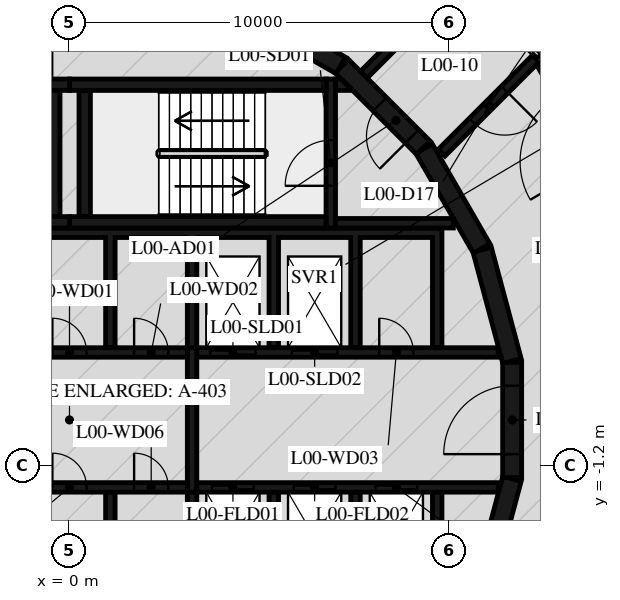
"""IFC4 building model, lengths in metres.
Left out: names, types, materials, properties, quantities, classifications, styles, units other than length and angle.
Written with IfcOpenShell. Run it as: python <this file> out.ifc"""

import sys

from ifc_helpers import new_model, si_unit, direction, frame, frame_2d, origin, place, context, subcontext, project, spatial, polyline, rectangle, outline, extrude, element, fill, save


model = new_model("IFC4")
c1 = context("Model", 3, precision=1e-05, world=origin(), true_north=direction((0.0, 1.0)))
c2 = subcontext(c1, "Body", "Model", "MODEL_VIEW")
j1 = project(units=[si_unit("LENGTHUNIT", "METRE"), si_unit("PLANEANGLEUNIT", "RADIAN")], contexts=[c1])
p1 = place(None, origin())
s1 = spatial("IfcSite", under=j1, at=p1, CompositionType="ELEMENT")
p2 = place(p1, origin())
s2 = spatial("IfcBuilding", under=s1, at=p2, CompositionType="ELEMENT")
p3 = place(p2, origin())
s3 = spatial("IfcBuildingStorey", under=s2, at=p3, CompositionType="ELEMENT", Elevation=0.0)
p4 = place(p3, frame((10.858, -4.479, 0.0), z_axis=(0.0, 0.0, 1.0), x_axis=(0.258734743916, 0.965948410781, 0.0)))
e1 = element("IfcWall", 1, at=p4, inside=s3, PredefinedType="SHEAR", context=c2, shape_type="SweptSolid", body=[
    extrude(rectangle(XDim=3.033, YDim=0.5, at=frame_2d((1.516, 0.0))), origin(), (0.0, 0.0, 1.0), 8.62),
])
p5 = place(p3, frame((11.647, -1.516, 0.0), z_axis=(0.0, 0.0, 1.0), x_axis=(0.0, 1.0, 0.0)))
e2 = element("IfcWall", 2, at=p5, inside=s3, PredefinedType="SHEAR", context=c2, shape_type="SweptSolid", body=[
    extrude(rectangle(XDim=3.033, YDim=0.5, at=frame_2d((1.516, 0.0))), origin(), (0.0, 0.0, 1.0), 8.62),
])
p6 = place(p5, frame((0.616, 0.0, 0.0)))
e3 = element("IfcOpeningElement", 3, at=p6, cuts=e2, PredefinedType="OPENING", context=c2, shape_type="SweptSolid", body=[
    extrude(rectangle(XDim=1.8, YDim=2.1, at=frame_2d((0.9, 1.05))), frame((0.0, 0.26, 0.0), z_axis=(0.0, -1.0, 0.0), x_axis=(1.0, 0.0, 0.0)), (0.0, 0.0, 1.0), 0.52),
])
for number, where, z_axis, x_axis in (
    (4, (11.643, 1.55, 0.0), (0.0, 0.0, 1.0), (-0.259, 0.966, 0.0)),
    (5, (10.845, 4.51, 0.0), (0.0, 0.0, 1.0), (-0.5, 0.866, 0.0)),
):
    element("IfcWall", number, at=place(p3, frame(where, z_axis=z_axis, x_axis=x_axis)), inside=s3, PredefinedType="SHEAR", context=c2, shape_type="SweptSolid", body=[
        extrude(rectangle(XDim=3.033, YDim=0.5, at=frame_2d((1.516, 0.0))), origin(), (0.0, 0.0, 1.0), 8.62),
    ])
p7 = place(p3, frame((9.308, 7.164, 0.0), z_axis=(0.0, 0.0, 1.0), x_axis=(-0.707106781187, 0.707106781187, 0.0)))
e6 = element("IfcWall", 6, at=p7, inside=s3, PredefinedType="SHEAR", context=c2, shape_type="SweptSolid", body=[
    extrude(rectangle(XDim=3.032, YDim=0.5, at=frame_2d((1.516, 0.0))), origin(), (0.0, 0.0, 1.0), 8.62),
])
p8 = place(p7, frame((0.416, 0.0, 0.0)))
e7 = element("IfcOpeningElement", 7, at=p8, cuts=e6, PredefinedType="OPENING", context=c2, shape_type="SweptSolid", body=[
    extrude(rectangle(XDim=1.2, YDim=2.1, at=frame_2d((0.6, 1.05))), frame((0.0, 0.26, 0.0), z_axis=(0.0, -1.0, 0.0), x_axis=(1.0, 0.0, 0.0)), (0.0, 0.0, 1.0), 0.52),
])
p9 = place(p3, frame((7.137, 9.329, 0.0), z_axis=(0.0, 0.0, 1.0), x_axis=(-0.865975092491, 0.500087131594, 0.0)))
e8 = element("IfcWall", 8, at=p9, inside=s3, PredefinedType="SHEAR", context=c2, shape_type="SweptSolid", body=[
    extrude(rectangle(XDim=3.033, YDim=0.5, at=frame_2d((1.516, 0.0))), origin(), (0.0, 0.0, 1.0), 8.62),
])
for number, where, z_axis, x_axis in (
    (9, (0.0, 5.2, 0.0), (0.0, 0.0, 1.0), (1.0, 0.0, 0.0)),
    (10, (0.0, 8.82, 0.0), (0.0, 0.0, 1.0), (1.0, 0.0, 0.0)),
):
    element("IfcWall", number, at=place(p3, frame(where, z_axis=z_axis, x_axis=x_axis)), inside=s3, PredefinedType="SHEAR", context=c2, shape_type="SweptSolid", body=[
        extrude(rectangle(XDim=6.75, YDim=0.3, at=frame_2d((3.375, 0.0))), origin(), (0.0, 0.0, 1.0), 8.62),
    ])
p10 = place(p3, frame((0.4, 5.35, 0.0), z_axis=(0.0, 0.0, 1.0), x_axis=(0.0, 1.0, 0.0)))
e11 = element("IfcWall", 11, at=p10, inside=s3, PredefinedType="SHEAR", context=c2, shape_type="SweptSolid", body=[
    extrude(rectangle(XDim=3.32, YDim=0.3, at=frame_2d((1.66, 0.0))), origin(), (0.0, 0.0, 1.0), 8.62),
])
p11 = place(p3, frame((6.875, 5.05, 0.0), z_axis=(0.0, 0.0, 1.0), x_axis=(0.0, 1.0, 0.0)))
e12 = element("IfcWall", 12, at=p11, inside=s3, PredefinedType="SHEAR", context=c2, shape_type="SweptSolid", body=[
    extrude(rectangle(XDim=3.92, YDim=0.25, at=frame_2d((1.96, 0.0))), origin(), (0.0, 0.0, 1.0), 8.62),
])
p12 = place(p11, frame((1.11, 0.0, 0.0)))
e13 = element("IfcOpeningElement", 13, at=p12, cuts=e12, PredefinedType="OPENING", context=c2, shape_type="SweptSolid", body=[
    extrude(rectangle(XDim=1.2, YDim=2.1, at=frame_2d((0.6, 1.05))), frame((0.0, 0.135, 0.0), z_axis=(0.0, -1.0, 0.0), x_axis=(1.0, 0.0, 0.0)), (0.0, 0.0, 1.0), 0.27),
])
p13 = place(p3, frame((7.0, 5.175, 0.0), z_axis=(0.0, 0.0, 1.0), x_axis=(1.0, 0.0, 0.0)))
e14 = element("IfcWall", 14, at=p13, inside=s3, PredefinedType="SHEAR", context=c2, shape_type="SweptSolid", body=[
    extrude(rectangle(XDim=3.1, YDim=0.25, at=frame_2d((1.55, 0.0))), origin(), (0.0, 0.0, 1.0), 8.62),
])
p14 = place(p3, origin())
e15 = element("IfcWall", 15, at=p14, inside=s3, PredefinedType="SHEAR", context=c2, shape_type="SweptSolid", body=[
    extrude(outline(polyline([(7.448, 8.67), (7.0, 8.67), (7.0, 8.97), (7.148, 8.97), (7.448, 8.67)])), origin(), (0.0, 0.0, 1.0), 8.62),
])
for number, where, z_axis, x_axis in (
    (16, (-6.75, 5.2, 0.0), (0.0, 0.0, 1.0), (1.0, 0.0, 0.0)),
    (17, (-6.75, 8.82, 0.0), (0.0, 0.0, 1.0), (1.0, 0.0, 0.0)),
):
    element("IfcWall", number, at=place(p3, frame(where, z_axis=z_axis, x_axis=x_axis)), inside=s3, PredefinedType="SHEAR", context=c2, shape_type="SweptSolid", body=[
        extrude(rectangle(XDim=6.75, YDim=0.3, at=frame_2d((3.375, 0.0))), origin(), (0.0, 0.0, 1.0), 8.62),
    ])
p15 = place(p3, frame((-0.4, 5.35, 0.0), z_axis=(0.0, 0.0, 1.0), x_axis=(0.0, 1.0, 0.0)))
e18 = element("IfcWall", 18, at=p15, inside=s3, PredefinedType="SHEAR", context=c2, shape_type="SweptSolid", body=[
    extrude(rectangle(XDim=3.32, YDim=0.3, at=frame_2d((1.66, 0.0))), origin(), (0.0, 0.0, 1.0), 8.62),
])
p16 = place(p3, origin())
e19 = element("IfcWall", 19, at=p16, inside=s3, PredefinedType="SHEAR", context=c2, shape_type="SweptSolid", body=[
    extrude(outline(polyline([(-9.55, 4.8), (-7.65, 4.8), (-7.65, 1.9), (-7.4, 1.9), (-7.4, 4.8), (-5.5, 4.8), (-5.5, 1.9), (-5.25, 1.9), (-5.25, 4.8), (-3.35, 4.8), (-3.35, 1.9), (-3.1, 1.9), (-3.1, 4.8), (-1.2, 4.8), (-1.2, 1.9), (-0.95, 1.9), (-0.95, 4.8), (0.95, 4.8), (0.95, 1.9), (1.2, 1.9), (1.2, 4.8), (3.1, 4.8), (3.1, 1.9), (3.35, 1.9), (3.35, 4.8), (5.25, 4.8), (5.25, 1.9), (5.5, 1.9), (5.5, 4.8), (7.4, 4.8), (7.4, 1.9), (7.65, 1.9), (7.65, 4.8), (9.55, 4.8), (9.55, 1.9), (9.8, 1.9), (9.8, 4.8), (9.8, 5.05), (-9.8, 5.05), (-9.8, 4.8), (-9.8, 1.9), (-9.55, 1.9), (-9.55, 4.8)])), origin(), (0.0, 0.0, 1.0), 8.62),
])
p17 = place(p3, origin())
e20 = element("IfcWall", 20, at=p17, inside=s3, PredefinedType="SHEAR", context=c2, shape_type="SweptSolid", body=[
    extrude(outline(polyline([(9.8, -5.05), (9.8, -4.8), (9.8, -1.9), (9.55, -1.9), (9.55, -4.8), (7.65, -4.8), (7.65, -1.9), (7.4, -1.9), (7.4, -4.8), (5.5, -4.8), (5.5, -1.9), (5.25, -1.9), (5.25, -4.8), (3.35, -4.8), (3.35, -1.9), (3.1, -1.9), (3.1, -4.8), (1.2, -4.8), (1.2, -1.9), (0.95, -1.9), (0.95, -4.8), (-0.95, -4.8), (-0.95, -1.9), (-1.2, -1.9), (-1.2, -4.8), (-5.25, -4.8), (-5.25, -1.9), (-5.5, -1.9), (-5.5, -4.8), (-7.4, -4.8), (-7.4, -1.9), (-7.65, -1.9), (-7.65, -4.8), (-9.55, -4.8), (-9.55, -1.9), (-9.8, -1.9), (-9.8, -4.8), (-9.8, -5.05), (9.8, -5.05)])), origin(), (0.0, 0.0, 1.0), 8.62),
])
p18 = place(p3, frame((-11.28, 1.775, 0.0), z_axis=(0.0, 0.0, 1.0), x_axis=(1.0, 0.0, 0.0)))
e21 = element("IfcWall", 21, at=p18, inside=s3, PredefinedType="SHEAR", context=c2, shape_type="SweptSolid", body=[
    extrude(rectangle(XDim=14.38, YDim=0.25, at=frame_2d((7.19, 0.0))), origin(), (0.0, 0.0, 1.0), 8.62),
])
p19 = place(p18, frame((2.13, 0.0, 0.0)))
e22 = element("IfcOpeningElement", 22, at=p19, cuts=e21, PredefinedType="OPENING", context=c2, shape_type="SweptSolid", body=[
    extrude(rectangle(XDim=1.1, YDim=2.1, at=frame_2d((0.55, 1.05))), frame((0.0, 0.135, 0.0), z_axis=(0.0, -1.0, 0.0), x_axis=(1.0, 0.0, 0.0)), (0.0, 0.0, 1.0), 0.27),
])
p20 = place(p18, frame((4.28, 0.0, 0.0)))
e23 = element("IfcOpeningElement", 23, at=p20, cuts=e21, PredefinedType="OPENING", context=c2, shape_type="SweptSolid", body=[
    extrude(rectangle(XDim=1.1, YDim=2.1, at=frame_2d((0.55, 1.05))), frame((0.0, 0.135, 0.0), z_axis=(0.0, -1.0, 0.0), x_axis=(1.0, 0.0, 0.0)), (0.0, 0.0, 1.0), 0.27),
])
p21 = place(p18, frame((6.43, 0.0, 0.0)))
e24 = element("IfcOpeningElement", 24, at=p21, cuts=e21, PredefinedType="OPENING", context=c2, shape_type="SweptSolid", body=[
    extrude(rectangle(XDim=1.1, YDim=2.1, at=frame_2d((0.55, 1.05))), frame((0.0, 0.135, 0.0), z_axis=(0.0, -1.0, 0.0), x_axis=(1.0, 0.0, 0.0)), (0.0, 0.0, 1.0), 0.27),
])
p22 = place(p18, frame((8.58, 0.0, 0.0)))
e25 = element("IfcOpeningElement", 25, at=p22, cuts=e21, PredefinedType="OPENING", context=c2, shape_type="SweptSolid", body=[
    extrude(rectangle(XDim=1.1, YDim=2.1, at=frame_2d((0.55, 1.05))), frame((0.0, 0.135, 0.0), z_axis=(0.0, -1.0, 0.0), x_axis=(1.0, 0.0, 0.0)), (0.0, 0.0, 1.0), 0.27),
])
p23 = place(p18, frame((10.83, 0.0, 0.0)))
e26 = element("IfcOpeningElement", 26, at=p23, cuts=e21, PredefinedType="OPENING", context=c2, shape_type="SweptSolid", body=[
    extrude(rectangle(XDim=0.9, YDim=2.1, at=frame_2d((0.45, 1.05))), frame((0.0, 0.135, 0.0), z_axis=(0.0, -1.0, 0.0), x_axis=(1.0, 0.0, 0.0)), (0.0, 0.0, 1.0), 0.27),
])
p24 = place(p18, frame((12.98, 0.0, 0.0)))
e27 = element("IfcOpeningElement", 27, at=p24, cuts=e21, PredefinedType="OPENING", context=c2, shape_type="SweptSolid", body=[
    extrude(rectangle(XDim=0.9, YDim=2.1, at=frame_2d((0.45, 1.05))), frame((0.0, 0.135, 0.0), z_axis=(0.0, -1.0, 0.0), x_axis=(1.0, 0.0, 0.0)), (0.0, 0.0, 1.0), 0.27),
])
p25 = place(p3, frame((3.35, 1.775, 0.0), z_axis=(0.0, 0.0, 1.0), x_axis=(1.0, 0.0, 0.0)))
e28 = element("IfcWall", 28, at=p25, inside=s3, PredefinedType="SHEAR", context=c2, shape_type="SweptSolid", body=[
    extrude(rectangle(XDim=7.93, YDim=0.25, at=frame_2d((3.965, 0.0))), origin(), (0.0, 0.0, 1.0), 8.62),
])
p26 = place(p25, frame((0.35, 0.0, 0.0)))
e29 = element("IfcOpeningElement", 29, at=p26, cuts=e28, PredefinedType="OPENING", context=c2, shape_type="SweptSolid", body=[
    extrude(rectangle(XDim=1.2, YDim=2.4, at=frame_2d((0.6, 1.2))), frame((0.0, 0.135, 0.0), z_axis=(0.0, -1.0, 0.0), x_axis=(1.0, 0.0, 0.0)), (0.0, 0.0, 1.0), 0.27),
])
p27 = place(p25, frame((2.5, 0.0, 0.0)))
e30 = element("IfcOpeningElement", 30, at=p27, cuts=e28, PredefinedType="OPENING", context=c2, shape_type="SweptSolid", body=[
    extrude(rectangle(XDim=1.2, YDim=2.4, at=frame_2d((0.6, 1.2))), frame((0.0, 0.135, 0.0), z_axis=(0.0, -1.0, 0.0), x_axis=(1.0, 0.0, 0.0)), (0.0, 0.0, 1.0), 0.27),
])
p28 = place(p25, frame((4.8, 0.0, 0.0)))
e31 = element("IfcOpeningElement", 31, at=p28, cuts=e28, PredefinedType="OPENING", context=c2, shape_type="SweptSolid", body=[
    extrude(rectangle(XDim=0.9, YDim=2.1, at=frame_2d((0.45, 1.05))), frame((0.0, 0.135, 0.0), z_axis=(0.0, -1.0, 0.0), x_axis=(1.0, 0.0, 0.0)), (0.0, 0.0, 1.0), 0.27),
])
p29 = place(p3, frame((-11.28, -1.775, 0.0), z_axis=(0.0, 0.0, 1.0), x_axis=(1.0, 0.0, 0.0)))
e32 = element("IfcWall", 32, at=p29, inside=s3, PredefinedType="SHEAR", context=c2, shape_type="SweptSolid", body=[
    extrude(rectangle(XDim=14.38, YDim=0.25, at=frame_2d((7.19, 0.0))), origin(), (0.0, 0.0, 1.0), 8.62),
])
p30 = place(p29, frame((2.03, 0.0, 0.0)))
e33 = element("IfcOpeningElement", 33, at=p30, cuts=e32, PredefinedType="OPENING", context=c2, shape_type="SweptSolid", body=[
    extrude(rectangle(XDim=1.3, YDim=2.1, at=frame_2d((0.65, 1.05))), frame((0.0, 0.135, 0.0), z_axis=(0.0, -1.0, 0.0), x_axis=(1.0, 0.0, 0.0)), (0.0, 0.0, 1.0), 0.27),
])
p31 = place(p29, frame((4.18, 0.0, 0.0)))
e34 = element("IfcOpeningElement", 34, at=p31, cuts=e32, PredefinedType="OPENING", context=c2, shape_type="SweptSolid", body=[
    extrude(rectangle(XDim=1.3, YDim=2.1, at=frame_2d((0.65, 1.05))), frame((0.0, 0.135, 0.0), z_axis=(0.0, -1.0, 0.0), x_axis=(1.0, 0.0, 0.0)), (0.0, 0.0, 1.0), 0.27),
])
p32 = place(p29, frame((7.605, 0.0, 0.0)))
e35 = element("IfcOpeningElement", 35, at=p32, cuts=e32, PredefinedType="OPENING", context=c2, shape_type="SweptSolid", body=[
    extrude(rectangle(XDim=0.9, YDim=2.1, at=frame_2d((0.45, 1.05))), frame((0.0, 0.135, 0.0), z_axis=(0.0, -1.0, 0.0), x_axis=(1.0, 0.0, 0.0)), (0.0, 0.0, 1.0), 0.27),
])
p33 = place(p29, frame((10.83, 0.0, 0.0)))
e36 = element("IfcOpeningElement", 36, at=p33, cuts=e32, PredefinedType="OPENING", context=c2, shape_type="SweptSolid", body=[
    extrude(rectangle(XDim=0.9, YDim=2.1, at=frame_2d((0.45, 1.05))), frame((0.0, 0.135, 0.0), z_axis=(0.0, -1.0, 0.0), x_axis=(1.0, 0.0, 0.0)), (0.0, 0.0, 1.0), 0.27),
])
p34 = place(p29, frame((12.98, 0.0, 0.0)))
e37 = element("IfcOpeningElement", 37, at=p34, cuts=e32, PredefinedType="OPENING", context=c2, shape_type="SweptSolid", body=[
    extrude(rectangle(XDim=0.9, YDim=2.1, at=frame_2d((0.45, 1.05))), frame((0.0, 0.135, 0.0), z_axis=(0.0, -1.0, 0.0), x_axis=(1.0, 0.0, 0.0)), (0.0, 0.0, 1.0), 0.27),
])
p35 = place(p3, frame((3.35, -1.775, 0.0), z_axis=(0.0, 0.0, 1.0), x_axis=(1.0, 0.0, 0.0)))
e38 = element("IfcWall", 38, at=p35, inside=s3, PredefinedType="SHEAR", context=c2, shape_type="SweptSolid", body=[
    extrude(rectangle(XDim=7.93, YDim=0.25, at=frame_2d((3.965, 0.0))), origin(), (0.0, 0.0, 1.0), 8.62),
])
p36 = place(p35, frame((0.4, 0.0, 0.0)))
e39 = element("IfcOpeningElement", 39, at=p36, cuts=e38, PredefinedType="OPENING", context=c2, shape_type="SweptSolid", body=[
    extrude(rectangle(XDim=1.1, YDim=2.4, at=frame_2d((0.55, 1.2))), frame((0.0, 0.135, 0.0), z_axis=(0.0, -1.0, 0.0), x_axis=(1.0, 0.0, 0.0)), (0.0, 0.0, 1.0), 0.27),
])
p37 = place(p35, frame((2.55, 0.0, 0.0)))
e40 = element("IfcOpeningElement", 40, at=p37, cuts=e38, PredefinedType="OPENING", context=c2, shape_type="SweptSolid", body=[
    extrude(rectangle(XDim=1.1, YDim=2.4, at=frame_2d((0.55, 1.2))), frame((0.0, 0.135, 0.0), z_axis=(0.0, -1.0, 0.0), x_axis=(1.0, 0.0, 0.0)), (0.0, 0.0, 1.0), 0.27),
])
p38 = place(p35, frame((4.7, 0.0, 0.0)))
e41 = element("IfcOpeningElement", 41, at=p38, cuts=e38, PredefinedType="OPENING", context=c2, shape_type="SweptSolid", body=[
    extrude(rectangle(XDim=1.1, YDim=2.4, at=frame_2d((0.55, 1.2))), frame((0.0, 0.135, 0.0), z_axis=(0.0, -1.0, 0.0), x_axis=(1.0, 0.0, 0.0)), (0.0, 0.0, 1.0), 0.27),
])
p39 = place(p3, frame((3.225, -1.9, 0.0), z_axis=(0.0, 0.0, 1.0), x_axis=(0.0, 1.0, 0.0)))
e42 = element("IfcWall", 42, at=p39, inside=s3, PredefinedType="SHEAR", context=c2, shape_type="SweptSolid", body=[
    extrude(rectangle(XDim=3.8, YDim=0.25, at=frame_2d((1.9, 0.0))), origin(), (0.0, 0.0, 1.0), 8.62),
])
p40 = place(p3, frame((7.74, 9.08, 0.0), z_axis=(0.0, 0.0, 1.0), x_axis=(0.707106781187, 0.707106781187, 0.0)))
e43 = element("IfcWall", 43, at=p40, inside=s3, PredefinedType="PARTITIONING", context=c2, shape_type="SweptSolid", body=[
    extrude(rectangle(XDim=3.507, YDim=0.25, at=frame_2d((1.754, 0.0))), origin(), (0.0, 0.0, 1.0), 8.62),
])
p41 = place(p40, frame((1.154, 0.0, 0.0)))
e44 = element("IfcOpeningElement", 44, at=p41, cuts=e43, PredefinedType="OPENING", context=c2, shape_type="SweptSolid", body=[
    extrude(rectangle(XDim=1.2, YDim=2.1, at=frame_2d((0.6, 1.05))), frame((0.0, 0.135, 0.0), z_axis=(0.0, -1.0, 0.0), x_axis=(1.0, 0.0, 0.0)), (0.0, 0.0, 1.0), 0.27),
])
p42 = place(p3, frame((12.27, 9.51, 0.0), z_axis=(0.0, 0.0, 1.0), x_axis=(-0.707106781187, -0.707106781187, 0.0)))
e45 = element("IfcWall", 45, at=p42, inside=s3, PredefinedType="PARTITIONING", context=c2, shape_type="SweptSolid", body=[
    extrude(rectangle(XDim=3.507, YDim=0.25, at=frame_2d((1.754, 0.0))), origin(), (0.0, 0.0, 1.0), 8.62),
])
p43 = place(p42, frame((1.154, 0.0, 0.0)))
e46 = element("IfcOpeningElement", 46, at=p43, cuts=e45, PredefinedType="OPENING", context=c2, shape_type="SweptSolid", body=[
    extrude(rectangle(XDim=1.2, YDim=2.1, at=frame_2d((0.6, 1.05))), frame((0.0, 0.135, 0.0), z_axis=(0.0, -1.0, 0.0), x_axis=(1.0, 0.0, 0.0)), (0.0, 0.0, 1.0), 0.27),
])
p44 = place(p3, frame((12.32, 9.45, 0.0), z_axis=(0.0, 0.0, 1.0), x_axis=(0.866177122335, 0.499737123639, 0.0)))
e47 = element("IfcWall", 47, at=p44, inside=s3, PredefinedType="PARTITIONING", context=c2, shape_type="SweptSolid", body=[
    extrude(rectangle(XDim=2.401, YDim=0.16, at=frame_2d((1.201, 0.0))), origin(), (0.0, 0.0, 1.0), 3.0),
])
p45 = place(p3, frame((14.35, 5.94, 0.0), z_axis=(0.0, 0.0, 1.0), x_axis=(-0.500636730463, 0.865657475051, 0.0)))
e48 = element("IfcWall", 48, at=p45, inside=s3, PredefinedType="PARTITIONING", context=c2, shape_type="SweptSolid", body=[
    extrude(rectangle(XDim=3.975, YDim=0.16, at=frame_2d((1.987, 0.0))), origin(), (0.0, 0.0, 1.0), 3.0),
])
p46 = place(p45, frame((0.987, 0.0, 0.0)))
e49 = element("IfcOpeningElement", 49, at=p46, cuts=e48, PredefinedType="OPENING", context=c2, shape_type="SweptSolid", body=[
    extrude(rectangle(XDim=2.0, YDim=2.4, at=frame_2d((1.0, 1.2))), frame((0.0, 0.09, 0.0), z_axis=(0.0, -1.0, 0.0), x_axis=(1.0, 0.0, 0.0)), (0.0, 0.0, 1.0), 0.18),
])
p47 = place(p12, origin())
e50 = element("IfcDoor", 50, at=p47, inside=s3, OperationType="SINGLE_SWING_LEFT", PredefinedType="DOOR", context=c2, shape_type="SweptSolid", body=[
    extrude(rectangle(XDim=1.2, YDim=2.1, at=frame_2d((0.6, 1.05))), frame((0.0, 0.025, 0.0), z_axis=(0.0, -1.0, 0.0), x_axis=(1.0, 0.0, 0.0)), (0.0, 0.0, 1.0), 0.05),
])
fill(e13, e50)
p48 = place(p8, origin())
e51 = element("IfcDoor", 51, at=p48, inside=s3, OperationType="SINGLE_SWING_RIGHT", PredefinedType="DOOR", context=c2, shape_type="SweptSolid", body=[
    extrude(rectangle(XDim=1.2, YDim=2.1, at=frame_2d((0.6, 1.05))), frame((0.0, 0.025, 0.0), z_axis=(0.0, -1.0, 0.0), x_axis=(1.0, 0.0, 0.0)), (0.0, 0.0, 1.0), 0.05),
])
fill(e7, e51)
p49 = place(p6, origin())
e52 = element("IfcDoor", 52, at=p49, inside=s3, OperationType="DOUBLE_DOOR_SINGLE_SWING", PredefinedType="DOOR", context=c2, shape_type="SweptSolid", body=[
    extrude(rectangle(XDim=1.8, YDim=2.1, at=frame_2d((0.9, 1.05))), frame((0.0, 0.025, 0.0), z_axis=(0.0, -1.0, 0.0), x_axis=(1.0, 0.0, 0.0)), (0.0, 0.0, 1.0), 0.05),
])
fill(e3, e52)
p50 = place(p26, origin())
e53 = element("IfcDoor", 53, at=p50, inside=s3, OperationType="DOUBLE_DOOR_SLIDING", PredefinedType="DOOR", context=c2, shape_type="SweptSolid", body=[
    extrude(rectangle(XDim=1.2, YDim=2.4, at=frame_2d((0.6, 1.2))), frame((0.0, 0.025, 0.0), z_axis=(0.0, -1.0, 0.0), x_axis=(1.0, 0.0, 0.0)), (0.0, 0.0, 1.0), 0.05),
])
fill(e29, e53)
p51 = place(p27, origin())
e54 = element("IfcDoor", 54, at=p51, inside=s3, OperationType="DOUBLE_DOOR_SLIDING", PredefinedType="DOOR", context=c2, shape_type="SweptSolid", body=[
    extrude(rectangle(XDim=1.2, YDim=2.4, at=frame_2d((0.6, 1.2))), frame((0.0, 0.025, 0.0), z_axis=(0.0, -1.0, 0.0), x_axis=(1.0, 0.0, 0.0)), (0.0, 0.0, 1.0), 0.05),
])
fill(e30, e54)
p52 = place(p36, origin())
e55 = element("IfcDoor", 55, at=p52, inside=s3, OperationType="DOUBLE_DOOR_SLIDING", PredefinedType="DOOR", context=c2, shape_type="SweptSolid", body=[
    extrude(rectangle(XDim=1.1, YDim=2.4, at=frame_2d((0.55, 1.2))), frame((0.0, 0.025, 0.0), z_axis=(0.0, -1.0, 0.0), x_axis=(1.0, 0.0, 0.0)), (0.0, 0.0, 1.0), 0.05),
])
fill(e39, e55)
p53 = place(p37, origin())
e56 = element("IfcDoor", 56, at=p53, inside=s3, OperationType="DOUBLE_DOOR_SLIDING", PredefinedType="DOOR", context=c2, shape_type="SweptSolid", body=[
    extrude(rectangle(XDim=1.1, YDim=2.4, at=frame_2d((0.55, 1.2))), frame((0.0, 0.025, 0.0), z_axis=(0.0, -1.0, 0.0), x_axis=(1.0, 0.0, 0.0)), (0.0, 0.0, 1.0), 0.05),
])
fill(e40, e56)
p54 = place(p38, origin())
e57 = element("IfcDoor", 57, at=p54, inside=s3, OperationType="DOUBLE_DOOR_SLIDING", PredefinedType="DOOR", context=c2, shape_type="SweptSolid", body=[
    extrude(rectangle(XDim=1.1, YDim=2.4, at=frame_2d((0.55, 1.2))), frame((0.0, 0.025, 0.0), z_axis=(0.0, -1.0, 0.0), x_axis=(1.0, 0.0, 0.0)), (0.0, 0.0, 1.0), 0.05),
])
fill(e41, e57)
p55 = place(p23, origin())
e58 = element("IfcDoor", 58, at=p55, inside=s3, OperationType="SINGLE_SWING_RIGHT", PredefinedType="DOOR", context=c2, shape_type="SweptSolid", body=[
    extrude(rectangle(XDim=0.9, YDim=2.1, at=frame_2d((0.45, 1.05))), frame((0.0, 0.025, 0.0), z_axis=(0.0, -1.0, 0.0), x_axis=(1.0, 0.0, 0.0)), (0.0, 0.0, 1.0), 0.05),
])
fill(e26, e58)
p56 = place(p24, origin())
e59 = element("IfcDoor", 59, at=p56, inside=s3, OperationType="SINGLE_SWING_LEFT", PredefinedType="DOOR", context=c2, shape_type="SweptSolid", body=[
    extrude(rectangle(XDim=0.9, YDim=2.1, at=frame_2d((0.45, 1.05))), frame((0.0, 0.025, 0.0), z_axis=(0.0, -1.0, 0.0), x_axis=(1.0, 0.0, 0.0)), (0.0, 0.0, 1.0), 0.05),
])
fill(e27, e59)
p57 = place(p28, origin())
e60 = element("IfcDoor", 60, at=p57, inside=s3, OperationType="SINGLE_SWING_RIGHT", PredefinedType="DOOR", context=c2, shape_type="SweptSolid", body=[
    extrude(rectangle(XDim=0.9, YDim=2.1, at=frame_2d((0.45, 1.05))), frame((0.0, 0.025, 0.0), z_axis=(0.0, -1.0, 0.0), x_axis=(1.0, 0.0, 0.0)), (0.0, 0.0, 1.0), 0.05),
])
fill(e31, e60)
p58 = place(p33, origin())
e61 = element("IfcDoor", 61, at=p58, inside=s3, OperationType="SINGLE_SWING_RIGHT", PredefinedType="DOOR", context=c2, shape_type="SweptSolid", body=[
    extrude(rectangle(XDim=0.9, YDim=2.1, at=frame_2d((0.45, 1.05))), frame((0.0, 0.025, 0.0), z_axis=(0.0, -1.0, 0.0), x_axis=(1.0, 0.0, 0.0)), (0.0, 0.0, 1.0), 0.05),
])
fill(e36, e61)
p59 = place(p34, origin())
e62 = element("IfcDoor", 62, at=p59, inside=s3, OperationType="SINGLE_SWING_LEFT", PredefinedType="DOOR", context=c2, shape_type="SweptSolid", body=[
    extrude(rectangle(XDim=0.9, YDim=2.1, at=frame_2d((0.45, 1.05))), frame((0.0, 0.025, 0.0), z_axis=(0.0, -1.0, 0.0), x_axis=(1.0, 0.0, 0.0)), (0.0, 0.0, 1.0), 0.05),
])
fill(e37, e62)
p60 = place(p43, origin())
e63 = element("IfcDoor", 63, at=p60, inside=s3, OperationType="SINGLE_SWING_LEFT", PredefinedType="DOOR", context=c2, shape_type="SweptSolid", body=[
    extrude(rectangle(XDim=1.2, YDim=2.1, at=frame_2d((0.6, 1.05))), frame((0.0, 0.025, 0.0), z_axis=(0.0, -1.0, 0.0), x_axis=(1.0, 0.0, 0.0)), (0.0, 0.0, 1.0), 0.05),
])
fill(e46, e63)
save(model, sys.argv[1])
